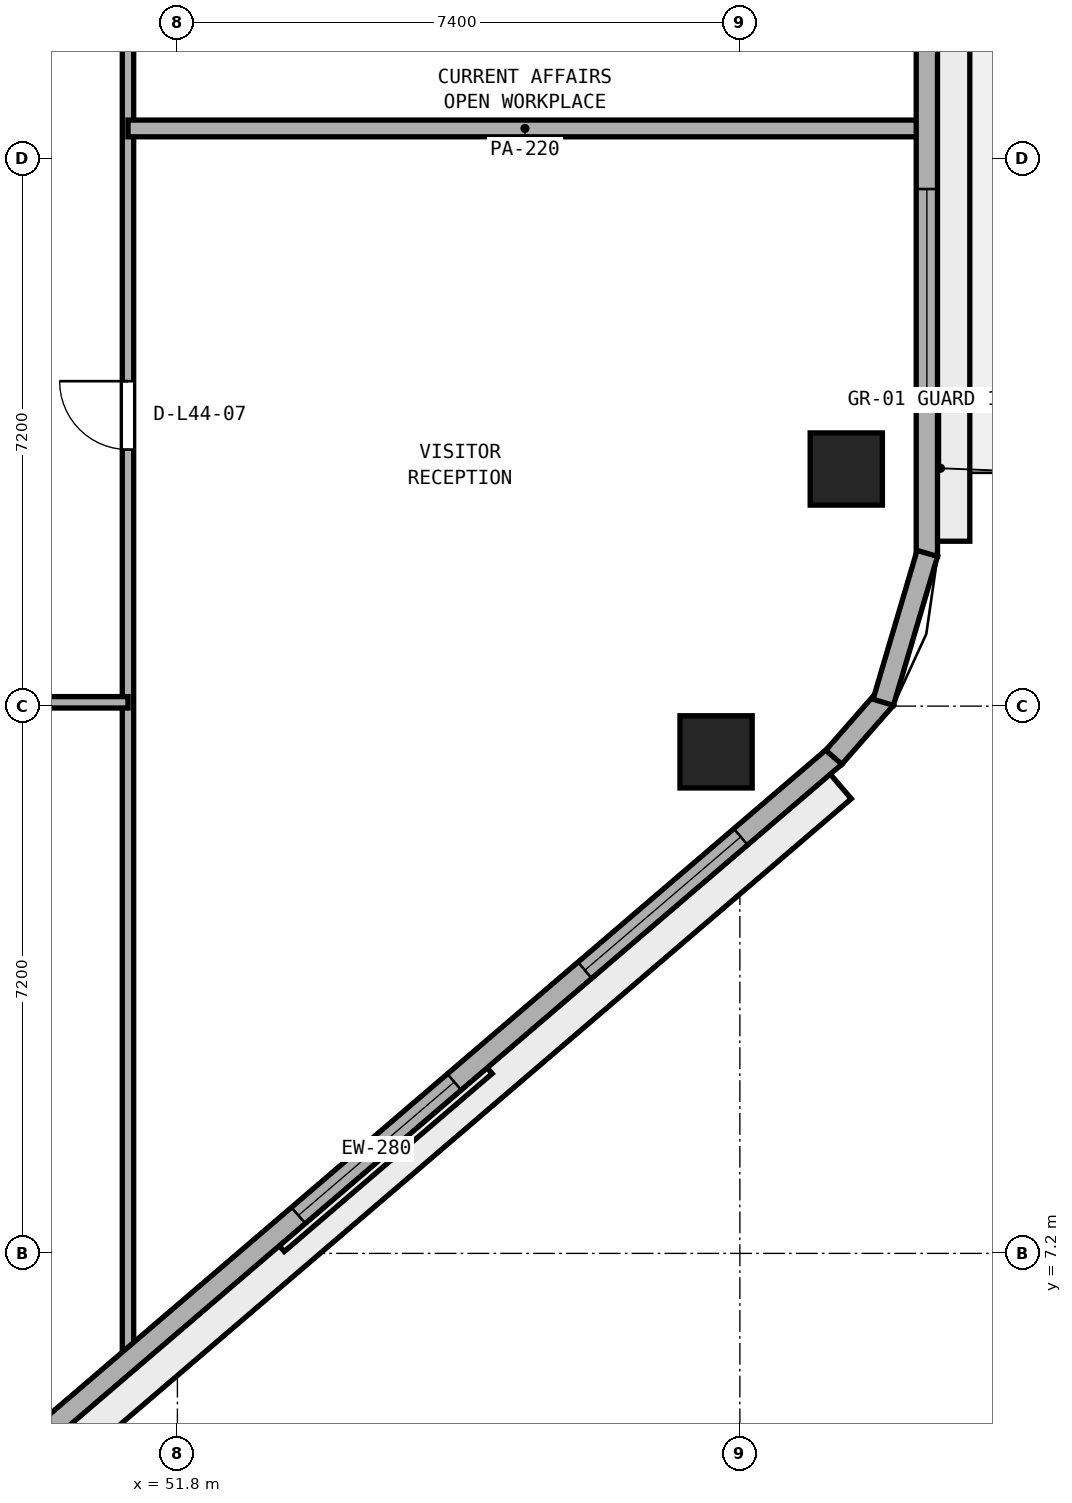
"""IFC4 building model, lengths in metres.
Left out: names, types, materials, properties, quantities, classifications, styles, units other than length and angle.
Written with IfcOpenShell. Run it as: python <this file> out.ifc"""

import sys

from ifc_helpers import new_model, si_unit, direction, frame, frame_2d, origin, origin_2d, place, context, subcontext, project, spatial, rectangle, extrude, element, fill, save


model = new_model("IFC4")
c1 = context("Model", 3, precision=1e-05, world=origin(), true_north=direction((0.0, 1.0)))
c2 = subcontext(c1, "Body", "Model", "MODEL_VIEW")
j1 = project(units=[si_unit("LENGTHUNIT", "METRE"), si_unit("PLANEANGLEUNIT", "RADIAN")], contexts=[c1])
p1 = place(None, origin())
s1 = spatial("IfcSite", under=j1, at=p1, CompositionType="ELEMENT")
p2 = place(p1, origin())
s2 = spatial("IfcBuilding", under=s1, at=p2, CompositionType="ELEMENT")
p3 = place(p2, frame((0.0, 0.0, 174.4)))
s3 = spatial("IfcBuildingStorey", under=s2, at=p3, CompositionType="ELEMENT", Elevation=174.4)
for number, where, z_axis, x_axis in (
    (1, (58.887, 13.798, 0.0), (0.0, 0.0, 1.0), (1.0, 0.0, 0.0)),
    (2, (60.6, 17.519, 0.0), (0.0, 0.0, 1.0), (1.0, 0.0, 0.0)),
):
    element("IfcColumn", number, at=place(p3, frame(where, z_axis=z_axis, x_axis=x_axis)), inside=s3, PredefinedType="COLUMN", context=c2, shape_type="SweptSolid", body=[
        extrude(rectangle(XDim=0.95, YDim=0.95, at=origin_2d()), origin(), (0.0, 0.0, 1.0), 3.8),
    ])
p4 = place(p3, frame((51.15, 5.736, 0.0), z_axis=(0.0, 0.0, 1.0), x_axis=(0.0, 1.0, 0.0)))
e3 = element("IfcWall", 3, at=p4, inside=s3, PredefinedType="PARTITIONING", context=c2, shape_type="SweptSolid", body=[
    extrude(rectangle(XDim=18.114, YDim=0.15, at=frame_2d((9.057, 0.0))), origin(), (0.0, 0.0, 1.0), 3.54),
])
p5 = place(p4, frame((12.039, 0.0, 0.0)))
e4 = element("IfcOpeningElement", 4, at=p5, cuts=e3, PredefinedType="OPENING", context=c2, shape_type="SweptSolid", body=[
    extrude(rectangle(XDim=0.9, YDim=2.1, at=frame_2d((0.45, 1.05))), frame((0.0, 0.085, 0.0), z_axis=(0.0, -1.0, 0.0), x_axis=(1.0, 0.0, 0.0)), (0.0, 0.0, 1.0), 0.17),
])
p6 = place(p3, frame((22.85, 14.45, 0.0), z_axis=(0.0, 0.0, 1.0), x_axis=(1.0, 0.0, 0.0)))
e5 = element("IfcWall", 5, at=p6, inside=s3, PredefinedType="PARTITIONING", context=c2, shape_type="SweptSolid", body=[
    extrude(rectangle(XDim=28.3, YDim=0.15, at=frame_2d((14.15, 0.0))), origin(), (0.0, 0.0, 1.0), 3.54),
])
p7 = place(p6, frame((13.65, 0.0, 0.0)))
e6 = element("IfcOpeningElement", 6, at=p7, cuts=e5, PredefinedType="OPENING", context=c2, shape_type="SweptSolid", body=[
    extrude(rectangle(XDim=1.0, YDim=2.12, at=frame_2d((0.5, 1.06))), frame((0.0, 0.085, 0.0), z_axis=(0.0, -1.0, 0.0), x_axis=(1.0, 0.0, 0.0)), (0.0, 0.0, 1.0), 0.17),
])
p8 = place(p3, frame((51.15, 22.0, 0.0), z_axis=(0.0, 0.0, 1.0), x_axis=(1.0, 0.0, 0.0)))
e7 = element("IfcWall", 7, at=p8, inside=s3, PredefinedType="PARTITIONING", context=c2, shape_type="SweptSolid", body=[
    extrude(rectangle(XDim=10.445, YDim=0.22, at=frame_2d((5.223, 0.0))), origin(), (0.0, 0.0, 1.0), 3.54),
])
p9 = place(p3, frame((48.385, 3.414, 0.0), z_axis=(0.0, 0.0, 1.0), x_axis=(0.759700260779, 0.650273414628, 0.0)))
e8 = element("IfcWall", 8, at=p9, inside=s3, PredefinedType="STANDARD", context=c2, shape_type="SweptSolid", body=[
    extrude(rectangle(XDim=15.881, YDim=0.28, at=frame_2d((7.94, 0.0))), origin(), (0.0, 0.0, 1.0), 3.54),
])
p10 = place(p9, frame((6.59, 0.0, 0.9)))
e9 = element("IfcOpeningElement", 9, at=p10, cuts=e8, PredefinedType="OPENING", context=c2, shape_type="SweptSolid", body=[
    extrude(rectangle(XDim=2.7, YDim=1.75, at=frame_2d((1.35, 0.875))), frame((0.0, 0.15, 0.0), z_axis=(0.0, -1.0, 0.0), x_axis=(1.0, 0.0, 0.0)), (0.0, 0.0, 1.0), 0.3),
])
p11 = place(p9, frame((11.551, 0.0, 0.9)))
e10 = element("IfcOpeningElement", 10, at=p11, cuts=e8, PredefinedType="OPENING", context=c2, shape_type="SweptSolid", body=[
    extrude(rectangle(XDim=2.7, YDim=1.75, at=frame_2d((1.35, 0.875))), frame((0.0, 0.15, 0.0), z_axis=(0.0, -1.0, 0.0), x_axis=(1.0, 0.0, 0.0)), (0.0, 0.0, 1.0), 0.3),
])
p12 = place(p3, frame((61.66, 16.369, 0.0), z_axis=(0.0, 0.0, 1.0), x_axis=(0.0, 1.0, 0.0)))
e11 = element("IfcWall", 11, at=p12, inside=s3, PredefinedType="STANDARD", context=c2, shape_type="SweptSolid", body=[
    extrude(rectangle(XDim=18.902, YDim=0.28, at=frame_2d((9.451, 0.0))), origin(), (0.0, 0.0, 1.0), 3.54),
])
p13 = place(p12, frame((8.601, 0.0, 0.0)))
e12 = element("IfcOpeningElement", 12, at=p13, cuts=e11, PredefinedType="OPENING", context=c2, shape_type="SweptSolid", body=[
    extrude(rectangle(XDim=1.1, YDim=2.2, at=frame_2d((0.55, 1.1))), frame((0.0, 0.15, 0.0), z_axis=(0.0, -1.0, 0.0), x_axis=(1.0, 0.0, 0.0)), (0.0, 0.0, 1.0), 0.3),
])
p14 = place(p12, frame((2.134, 0.0, 0.9)))
e13 = element("IfcOpeningElement", 13, at=p14, cuts=e11, PredefinedType="OPENING", context=c2, shape_type="SweptSolid", body=[
    extrude(rectangle(XDim=2.7, YDim=1.75, at=frame_2d((1.35, 0.875))), frame((0.0, 0.15, 0.0), z_axis=(0.0, -1.0, 0.0), x_axis=(1.0, 0.0, 0.0)), (0.0, 0.0, 1.0), 0.3),
])
p15 = place(p12, frame((14.069, 0.0, 0.9)))
e14 = element("IfcOpeningElement", 14, at=p15, cuts=e11, PredefinedType="OPENING", context=c2, shape_type="SweptSolid", body=[
    extrude(rectangle(XDim=2.7, YDim=1.75, at=frame_2d((1.35, 0.875))), frame((0.0, 0.15, 0.0), z_axis=(0.0, -1.0, 0.0), x_axis=(1.0, 0.0, 0.0)), (0.0, 0.0, 1.0), 0.3),
])
p16 = place(p3, frame((60.436, 13.727, 0.0), z_axis=(0.0, 0.0, 1.0), x_axis=(0.658571618609, 0.752518055041, 0.0)))
e15 = element("IfcWall", 15, at=p16, inside=s3, PredefinedType="STANDARD", context=c2, shape_type="SweptSolid", body=[
    extrude(rectangle(XDim=1.032, YDim=0.28, at=frame_2d((0.516, 0.0))), origin(), (0.0, 0.0, 1.0), 3.54),
])
p17 = place(p3, frame((61.086, 14.45, 0.0), z_axis=(0.0, 0.0, 1.0), x_axis=(0.283660953453, 0.958924639107, 0.0)))
e16 = element("IfcWall", 16, at=p17, inside=s3, PredefinedType="STANDARD", context=c2, shape_type="SweptSolid", body=[
    extrude(rectangle(XDim=2.042, YDim=0.28, at=frame_2d((1.021, 0.0))), origin(), (0.0, 0.0, 1.0), 3.54),
])
p18 = place(p5, origin())
e17 = element("IfcDoor", 17, at=p18, inside=s3, OperationType="SINGLE_SWING_RIGHT", PredefinedType="DOOR", context=c2, shape_type="SweptSolid", body=[
    extrude(rectangle(XDim=0.9, YDim=2.1, at=frame_2d((0.45, 1.05))), frame((0.0, 0.025, 0.0), z_axis=(0.0, -1.0, 0.0), x_axis=(1.0, 0.0, 0.0)), (0.0, 0.0, 1.0), 0.05),
])
fill(e4, e17)
p19 = place(p10, origin())
e18 = element("IfcWindow", 18, at=p19, inside=s3, PartitioningType="SINGLE_PANEL", PredefinedType="WINDOW", context=c2, shape_type="SweptSolid", body=[
    extrude(rectangle(XDim=2.7, YDim=1.75, at=frame_2d((1.35, 0.875))), frame((0.0, 0.03, 0.0), z_axis=(0.0, -1.0, 0.0), x_axis=(1.0, 0.0, 0.0)), (0.0, 0.0, 1.0), 0.06),
])
fill(e9, e18)
p20 = place(p11, origin())
e19 = element("IfcWindow", 19, at=p20, inside=s3, PartitioningType="SINGLE_PANEL", PredefinedType="WINDOW", context=c2, shape_type="SweptSolid", body=[
    extrude(rectangle(XDim=2.7, YDim=1.75, at=frame_2d((1.35, 0.875))), frame((0.0, 0.03, 0.0), z_axis=(0.0, -1.0, 0.0), x_axis=(1.0, 0.0, 0.0)), (0.0, 0.0, 1.0), 0.06),
])
fill(e10, e19)
p21 = place(p14, origin())
e20 = element("IfcWindow", 20, at=p21, inside=s3, PartitioningType="SINGLE_PANEL", PredefinedType="WINDOW", context=c2, shape_type="SweptSolid", body=[
    extrude(rectangle(XDim=2.7, YDim=1.75, at=frame_2d((1.35, 0.875))), frame((0.0, 0.03, 0.0), z_axis=(0.0, -1.0, 0.0), x_axis=(1.0, 0.0, 0.0)), (0.0, 0.0, 1.0), 0.06),
])
fill(e13, e20)
save(model, sys.argv[1])
